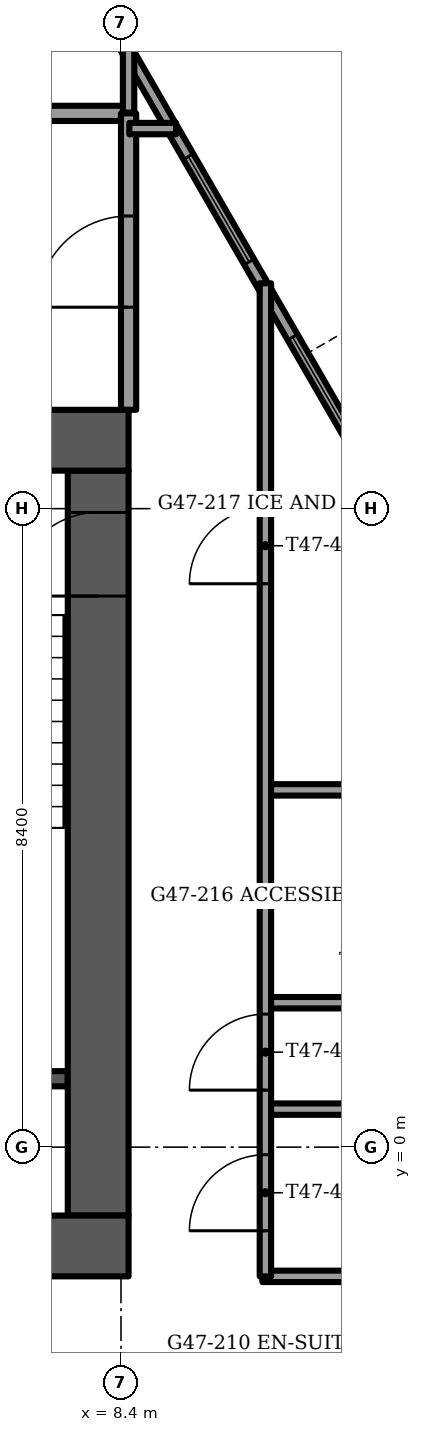
"""IFC4 building model, lengths in metres.
Left out: names, types, materials, properties, quantities, classifications, styles, units other than length and angle.
Written with IfcOpenShell. Run it as: python <this file> out.ifc"""

import sys

from ifc_helpers import new_model, si_unit, direction, frame, frame_2d, origin, place, context, subcontext, project, spatial, rectangle, extrude, element, fill, save


model = new_model("IFC4")
c1 = context("Model", 3, precision=1e-05, world=origin(), true_north=direction((0.0, 1.0)))
c2 = subcontext(c1, "Body", "Model", "MODEL_VIEW")
j1 = project(units=[si_unit("LENGTHUNIT", "METRE"), si_unit("PLANEANGLEUNIT", "RADIAN")], contexts=[c1])
p1 = place(None, origin())
s1 = spatial("IfcSite", under=j1, at=p1, CompositionType="ELEMENT")
p2 = place(p1, origin())
s2 = spatial("IfcBuilding", under=s1, at=p2, CompositionType="ELEMENT")
p3 = place(p2, frame((0.0, 0.0, 190.75)))
s3 = spatial("IfcBuildingStorey", under=s2, at=p3, CompositionType="ELEMENT", Elevation=190.75)
p4 = place(p3, frame((-8.5, -1.3, -0.3), z_axis=(0.0, 0.0, 1.0), x_axis=(1.0, 0.0, 0.0)))
e1 = element("IfcWall", 1, at=p4, inside=s3, PredefinedType="SHEAR", context=c2, shape_type="SweptSolid", body=[
    extrude(rectangle(XDim=17.0, YDim=0.8, at=frame_2d((8.5, 0.0))), origin(), (0.0, 0.0, 1.0), 3.75),
])
p5 = place(p4, frame((7.7, 0.0, 0.0)))
e2 = element("IfcOpeningElement", 2, at=p5, cuts=e1, PredefinedType="OPENING", context=c2, shape_type="SweptSolid", body=[
    extrude(rectangle(XDim=1.6, YDim=2.1, at=frame_2d((0.8, 1.05))), frame((0.0, 0.4, 0.0), z_axis=(0.0, -1.0, 0.0), x_axis=(1.0, 0.0, 0.0)), (0.0, 0.0, 1.0), 0.8),
])
p6 = place(p3, frame((-8.5, 9.3, -0.3), z_axis=(0.0, 0.0, 1.0), x_axis=(1.0, 0.0, 0.0)))
e3 = element("IfcWall", 3, at=p6, inside=s3, PredefinedType="SHEAR", context=c2, shape_type="SweptSolid", body=[
    extrude(rectangle(XDim=17.0, YDim=0.8, at=frame_2d((8.5, 0.0))), origin(), (0.0, 0.0, 1.0), 3.75),
])
p7 = place(p6, frame((7.7, 0.0, 0.0)))
e4 = element("IfcOpeningElement", 4, at=p7, cuts=e3, PredefinedType="OPENING", context=c2, shape_type="SweptSolid", body=[
    extrude(rectangle(XDim=1.6, YDim=2.1, at=frame_2d((0.8, 1.05))), frame((0.0, 0.4, 0.0), z_axis=(0.0, -1.0, 0.0), x_axis=(1.0, 0.0, 0.0)), (0.0, 0.0, 1.0), 0.8),
])
p8 = place(p6, frame((1.75, 0.0, 0.0)))
e5 = element("IfcOpeningElement", 5, at=p8, cuts=e3, PredefinedType="OPENING", context=c2, shape_type="SweptSolid", body=[
    extrude(rectangle(XDim=1.1, YDim=2.1, at=frame_2d((0.55, 1.05))), frame((0.0, 0.4, 0.0), z_axis=(0.0, -1.0, 0.0), x_axis=(1.0, 0.0, 0.0)), (0.0, 0.0, 1.0), 0.8),
])
p9 = place(p6, frame((14.15, 0.0, 0.0)))
e6 = element("IfcOpeningElement", 6, at=p9, cuts=e3, PredefinedType="OPENING", context=c2, shape_type="SweptSolid", body=[
    extrude(rectangle(XDim=1.1, YDim=2.1, at=frame_2d((0.55, 1.05))), frame((0.0, 0.4, 0.0), z_axis=(0.0, -1.0, 0.0), x_axis=(1.0, 0.0, 0.0)), (0.0, 0.0, 1.0), 0.8),
])
p10 = place(p3, frame((8.1, -0.9, -0.3), z_axis=(0.0, 0.0, 1.0), x_axis=(0.0, 1.0, 0.0)))
e7 = element("IfcWall", 7, at=p10, inside=s3, PredefinedType="SHEAR", context=c2, shape_type="SweptSolid", body=[
    extrude(rectangle(XDim=9.8, YDim=0.8, at=frame_2d((4.9, 0.0))), origin(), (0.0, 0.0, 1.0), 3.75),
])
p11 = place(p10, frame((8.15, 0.0, 0.0)))
e8 = element("IfcOpeningElement", 8, at=p11, cuts=e7, PredefinedType="OPENING", context=c2, shape_type="SweptSolid", body=[
    extrude(rectangle(XDim=1.1, YDim=2.1, at=frame_2d((0.55, 1.05))), frame((0.0, 0.4, 0.0), z_axis=(0.0, -1.0, 0.0), x_axis=(1.0, 0.0, 0.0)), (0.0, 0.0, 1.0), 0.8),
])
p12 = place(p3, frame((13.096, 12.282, 0.0), z_axis=(0.0, 0.0, 1.0), x_axis=(-0.500005767435, 0.866022073929, 0.0)))
e9 = element("IfcWall", 9, at=p12, inside=s3, PredefinedType="PARAPET", context=c2, shape_type="SweptSolid", body=[
    extrude(rectangle(XDim=6.465, YDim=0.9, at=frame_2d((3.232, 0.0))), origin(), (0.0, 0.0, 1.0), 1.1),
])
p13 = place(p3, frame((9.714, -14.025, 0.0), z_axis=(0.0, 0.0, 1.0), x_axis=(0.500006098247, 0.866021882931, 0.0)))
e10 = element("IfcWall", 10, at=p13, inside=s3, PredefinedType="SOLIDWALL", context=c2, shape_type="SweptSolid", body=[
    extrude(rectangle(XDim=14.578, YDim=0.15, at=frame_2d((7.289, 0.0))), origin(), (0.0, 0.0, 1.0), 3.45),
])
p14 = place(p13, frame((1.289, 0.0, 0.15)))
e11 = element("IfcOpeningElement", 11, at=p14, cuts=e10, PredefinedType="OPENING", context=c2, shape_type="SweptSolid", body=[
    extrude(rectangle(XDim=1.6, YDim=2.85, at=frame_2d((0.8, 1.425))), frame((0.0, 0.075, 0.0), z_axis=(0.0, -1.0, 0.0), x_axis=(1.0, 0.0, 0.0)), (0.0, 0.0, 1.0), 0.15),
])
p15 = place(p13, frame((3.489, 0.0, 0.0)))
e12 = element("IfcOpeningElement", 12, at=p15, cuts=e10, PredefinedType="OPENING", context=c2, shape_type="SweptSolid", body=[
    extrude(rectangle(XDim=1.4, YDim=2.4, at=frame_2d((0.7, 1.2))), frame((0.0, 0.075, 0.0), z_axis=(0.0, -1.0, 0.0), x_axis=(1.0, 0.0, 0.0)), (0.0, 0.0, 1.0), 0.15),
])
p16 = place(p13, frame((5.489, 0.0, 0.15)))
e13 = element("IfcOpeningElement", 13, at=p16, cuts=e10, PredefinedType="OPENING", context=c2, shape_type="SweptSolid", body=[
    extrude(rectangle(XDim=0.9, YDim=2.85, at=frame_2d((0.45, 1.425))), frame((0.0, 0.075, 0.0), z_axis=(0.0, -1.0, 0.0), x_axis=(1.0, 0.0, 0.0)), (0.0, 0.0, 1.0), 0.15),
])
p17 = place(p13, frame((6.646, 0.0, 0.0)))
e14 = element("IfcOpeningElement", 14, at=p17, cuts=e10, PredefinedType="OPENING", context=c2, shape_type="SweptSolid", body=[
    extrude(rectangle(XDim=1.4, YDim=2.4, at=frame_2d((0.7, 1.2))), frame((0.0, 0.075, 0.0), z_axis=(0.0, -1.0, 0.0), x_axis=(1.0, 0.0, 0.0)), (0.0, 0.0, 1.0), 0.15),
])
p18 = place(p13, frame((12.298, 0.0, 0.15)))
e15 = element("IfcOpeningElement", 15, at=p18, cuts=e10, PredefinedType="OPENING", context=c2, shape_type="SweptSolid", body=[
    extrude(rectangle(XDim=0.9, YDim=2.85, at=frame_2d((0.45, 1.425))), frame((0.0, 0.075, 0.0), z_axis=(0.0, -1.0, 0.0), x_axis=(1.0, 0.0, 0.0)), (0.0, 0.0, 1.0), 0.15),
])
p19 = place(p13, frame((10.198, 0.0, 0.15)))
e16 = element("IfcOpeningElement", 16, at=p19, cuts=e10, PredefinedType="OPENING", context=c2, shape_type="SweptSolid", body=[
    extrude(rectangle(XDim=1.4, YDim=2.85, at=frame_2d((0.7, 1.425))), frame((0.0, 0.075, 0.0), z_axis=(0.0, -1.0, 0.0), x_axis=(1.0, 0.0, 0.0)), (0.0, 0.0, 1.0), 0.15),
])
p20 = place(p3, frame((17.003, -0.335, 0.0), z_axis=(0.0, 0.0, 1.0), x_axis=(-0.50000659594, 0.866021595583, 0.0)))
e17 = element("IfcWall", 17, at=p20, inside=s3, PredefinedType="SOLIDWALL", context=c2, shape_type="SweptSolid", body=[
    extrude(rectangle(XDim=20.354, YDim=0.15, at=frame_2d((10.177, 0.0))), origin(), (0.0, 0.0, 1.0), 3.45),
])
p21 = place(p20, frame((1.288, 0.0, 0.15)))
e18 = element("IfcOpeningElement", 18, at=p21, cuts=e17, PredefinedType="OPENING", context=c2, shape_type="SweptSolid", body=[
    extrude(rectangle(XDim=0.9, YDim=2.85, at=frame_2d((0.45, 1.425))), frame((0.0, 0.075, 0.0), z_axis=(0.0, -1.0, 0.0), x_axis=(1.0, 0.0, 0.0)), (0.0, 0.0, 1.0), 0.15),
])
p22 = place(p20, frame((2.892, 0.0, 0.0)))
e19 = element("IfcOpeningElement", 19, at=p22, cuts=e17, PredefinedType="OPENING", context=c2, shape_type="SweptSolid", body=[
    extrude(rectangle(XDim=1.4, YDim=2.4, at=frame_2d((0.7, 1.2))), frame((0.0, 0.075, 0.0), z_axis=(0.0, -1.0, 0.0), x_axis=(1.0, 0.0, 0.0)), (0.0, 0.0, 1.0), 0.15),
])
p23 = place(p20, frame((6.138, 0.0, 0.15)))
e20 = element("IfcOpeningElement", 20, at=p23, cuts=e17, PredefinedType="OPENING", context=c2, shape_type="SweptSolid", body=[
    extrude(rectangle(XDim=0.9, YDim=2.85, at=frame_2d((0.45, 1.425))), frame((0.0, 0.075, 0.0), z_axis=(0.0, -1.0, 0.0), x_axis=(1.0, 0.0, 0.0)), (0.0, 0.0, 1.0), 0.15),
])
p24 = place(p20, frame((7.092, 0.0, 0.15)))
e21 = element("IfcOpeningElement", 21, at=p24, cuts=e17, PredefinedType="OPENING", context=c2, shape_type="SweptSolid", body=[
    extrude(rectangle(XDim=1.4, YDim=2.85, at=frame_2d((0.7, 1.425))), frame((0.0, 0.075, 0.0), z_axis=(0.0, -1.0, 0.0), x_axis=(1.0, 0.0, 0.0)), (0.0, 0.0, 1.0), 0.15),
])
p25 = place(p20, frame((9.092, 0.0, 0.15)))
e22 = element("IfcOpeningElement", 22, at=p25, cuts=e17, PredefinedType="OPENING", context=c2, shape_type="SweptSolid", body=[
    extrude(rectangle(XDim=1.6, YDim=2.85, at=frame_2d((0.8, 1.425))), frame((0.0, 0.075, 0.0), z_axis=(0.0, -1.0, 0.0), x_axis=(1.0, 0.0, 0.0)), (0.0, 0.0, 1.0), 0.15),
])
p26 = place(p20, frame((11.292, 0.0, 0.15)))
e23 = element("IfcOpeningElement", 23, at=p26, cuts=e17, PredefinedType="OPENING", context=c2, shape_type="SweptSolid", body=[
    extrude(rectangle(XDim=1.4, YDim=2.85, at=frame_2d((0.7, 1.425))), frame((0.0, 0.075, 0.0), z_axis=(0.0, -1.0, 0.0), x_axis=(1.0, 0.0, 0.0)), (0.0, 0.0, 1.0), 0.15),
])
p27 = place(p20, frame((13.834, 0.0, 0.15)))
e24 = element("IfcOpeningElement", 24, at=p27, cuts=e17, PredefinedType="OPENING", context=c2, shape_type="SweptSolid", body=[
    extrude(rectangle(XDim=1.6, YDim=2.85, at=frame_2d((0.8, 1.425))), frame((0.0, 0.075, 0.0), z_axis=(0.0, -1.0, 0.0), x_axis=(1.0, 0.0, 0.0)), (0.0, 0.0, 1.0), 0.15),
])
p28 = place(p20, frame((18.023, 0.0, 0.15)))
e25 = element("IfcOpeningElement", 25, at=p28, cuts=e17, PredefinedType="OPENING", context=c2, shape_type="SweptSolid", body=[
    extrude(rectangle(XDim=1.6, YDim=2.73, at=frame_2d((0.8, 1.365))), frame((0.0, 0.075, 0.0), z_axis=(0.0, -1.0, 0.0), x_axis=(1.0, 0.0, 0.0)), (0.0, 0.0, 1.0), 0.15),
])
p29 = place(p3, frame((4.45, 0.9, -0.3), z_axis=(0.0, 0.0, 1.0), x_axis=(1.0, 0.0, 0.0)))
e26 = element("IfcWall", 26, at=p29, inside=s3, PredefinedType="SOLIDWALL", context=c2, shape_type="SweptSolid", body=[
    extrude(rectangle(XDim=3.25, YDim=0.2, at=frame_2d((1.625, 0.0))), origin(), (0.0, 0.0, 1.0), 3.75),
])
p30 = place(p3, frame((-8.5, 13.6, 0.0), z_axis=(0.0, 0.0, 1.0), x_axis=(1.0, 0.0, 0.0)))
e27 = element("IfcWall", 27, at=p30, inside=s3, PredefinedType="PARTITIONING", context=c2, shape_type="SweptSolid", body=[
    extrude(rectangle(XDim=17.0, YDim=0.2, at=frame_2d((8.5, 0.0))), origin(), (0.0, 0.0, 1.0), 3.45),
])
p31 = place(p30, frame((8.0, 0.0, 0.0)))
e28 = element("IfcOpeningElement", 28, at=p31, cuts=e27, PredefinedType="OPENING", context=c2, shape_type="SweptSolid", body=[
    extrude(rectangle(XDim=1.0, YDim=2.1, at=frame_2d((0.5, 1.05))), frame((0.0, 0.1, 0.0), z_axis=(0.0, -1.0, 0.0), x_axis=(1.0, 0.0, 0.0)), (0.0, 0.0, 1.0), 0.2),
])
p32 = place(p3, frame((8.5, 9.7, 0.0), z_axis=(0.0, 0.0, 1.0), x_axis=(0.0, 1.0, 0.0)))
e29 = element("IfcWall", 29, at=p32, inside=s3, PredefinedType="PARTITIONING", context=c2, shape_type="SweptSolid", body=[
    extrude(rectangle(XDim=3.9, YDim=0.2, at=frame_2d((1.95, 0.0))), origin(), (0.0, 0.0, 1.0), 3.45),
])
p33 = place(p32, frame((1.35, 0.0, 0.0)))
e30 = element("IfcOpeningElement", 30, at=p33, cuts=e29, PredefinedType="OPENING", context=c2, shape_type="SweptSolid", body=[
    extrude(rectangle(XDim=1.2, YDim=2.1, at=frame_2d((0.6, 1.05))), frame((0.0, 0.1, 0.0), z_axis=(0.0, -1.0, 0.0), x_axis=(1.0, 0.0, 0.0)), (0.0, 0.0, 1.0), 0.2),
])
p34 = place(p3, frame((10.26, -1.7, 0.0), z_axis=(0.0, 0.0, 1.0), x_axis=(1.0, 0.0, 0.0)))
e31 = element("IfcWall", 31, at=p34, inside=s3, PredefinedType="PARTITIONING", context=c2, shape_type="SweptSolid", body=[
    extrude(rectangle(XDim=3.54, YDim=0.15, at=frame_2d((1.77, 0.0))), origin(), (0.0, 0.0, 1.0), 3.45),
])
p35 = place(p3, frame((10.3, 0.5, 0.0), z_axis=(0.0, 0.0, 1.0), x_axis=(1.0, 0.0, 0.0)))
e32 = element("IfcWall", 32, at=p35, inside=s3, PredefinedType="PARTITIONING", context=c2, shape_type="SweptSolid", body=[
    extrude(rectangle(XDim=6.273, YDim=0.15, at=frame_2d((3.136, 0.0))), origin(), (0.0, 0.0, 1.0), 3.45),
])
p36 = place(p3, frame((10.3, 1.9, 0.0), z_axis=(0.0, 0.0, 1.0), x_axis=(1.0, 0.0, 0.0)))
e33 = element("IfcWall", 33, at=p36, inside=s3, PredefinedType="PARTITIONING", context=c2, shape_type="SweptSolid", body=[
    extrude(rectangle(XDim=3.0, YDim=0.15, at=frame_2d((1.5, 0.0))), origin(), (0.0, 0.0, 1.0), 3.45),
])
p37 = place(p36, frame((1.05, 0.0, 0.0)))
e34 = element("IfcOpeningElement", 34, at=p37, cuts=e33, PredefinedType="OPENING", context=c2, shape_type="SweptSolid", body=[
    extrude(rectangle(XDim=0.9, YDim=2.1, at=frame_2d((0.45, 1.05))), frame((0.0, 0.075, 0.0), z_axis=(0.0, -1.0, 0.0), x_axis=(1.0, 0.0, 0.0)), (0.0, 0.0, 1.0), 0.15),
])
p38 = place(p3, frame((10.3, 4.7, 0.0), z_axis=(0.0, 0.0, 1.0), x_axis=(1.0, 0.0, 0.0)))
e35 = element("IfcWall", 35, at=p38, inside=s3, PredefinedType="PARTITIONING", context=c2, shape_type="SweptSolid", body=[
    extrude(rectangle(XDim=3.848, YDim=0.15, at=frame_2d((1.924, 0.0))), origin(), (0.0, 0.0, 1.0), 3.45),
])
p39 = place(p3, frame((8.51, 13.4, 0.0), z_axis=(0.0, 0.0, 1.0), x_axis=(1.0, 0.0, 0.0)))
e36 = element("IfcWall", 36, at=p39, inside=s3, PredefinedType="PARTITIONING", context=c2, shape_type="SweptSolid", body=[
    extrude(rectangle(XDim=0.615, YDim=0.15, at=frame_2d((0.308, 0.0))), origin(), (0.0, 0.0, 1.0), 3.45),
])
p40 = place(p3, frame((10.3, -1.7, 0.0), z_axis=(0.0, 0.0, 1.0), x_axis=(0.0, 1.0, 0.0)))
e37 = element("IfcWall", 37, at=p40, inside=s3, PredefinedType="PARTITIONING", context=c2, shape_type="SweptSolid", body=[
    extrude(rectangle(XDim=13.065, YDim=0.15, at=frame_2d((6.532, 0.0))), origin(), (0.0, 0.0, 1.0), 3.45),
])
p41 = place(p40, frame((0.6, 0.0, 0.0)))
e38 = element("IfcOpeningElement", 38, at=p41, cuts=e37, PredefinedType="OPENING", context=c2, shape_type="SweptSolid", body=[
    extrude(rectangle(XDim=1.0, YDim=2.1, at=frame_2d((0.5, 1.05))), frame((0.0, 0.075, 0.0), z_axis=(0.0, -1.0, 0.0), x_axis=(1.0, 0.0, 0.0)), (0.0, 0.0, 1.0), 0.15),
])
p42 = place(p40, frame((2.45, 0.0, 0.0)))
e39 = element("IfcOpeningElement", 39, at=p42, cuts=e37, PredefinedType="OPENING", context=c2, shape_type="SweptSolid", body=[
    extrude(rectangle(XDim=1.0, YDim=2.1, at=frame_2d((0.5, 1.05))), frame((0.0, 0.075, 0.0), z_axis=(0.0, -1.0, 0.0), x_axis=(1.0, 0.0, 0.0)), (0.0, 0.0, 1.0), 0.15),
])
p43 = place(p40, frame((9.112, 0.0, 0.0)))
e40 = element("IfcOpeningElement", 40, at=p43, cuts=e37, PredefinedType="OPENING", context=c2, shape_type="SweptSolid", body=[
    extrude(rectangle(XDim=1.0, YDim=2.1, at=frame_2d((0.5, 1.05))), frame((0.0, 0.075, 0.0), z_axis=(0.0, -1.0, 0.0), x_axis=(1.0, 0.0, 0.0)), (0.0, 0.0, 1.0), 0.15),
])
p44 = place(p3, frame((8.5, 13.61, 0.0), z_axis=(0.0, 0.0, 1.0), x_axis=(0.0, 1.0, 0.0)))
e41 = element("IfcWall", 41, at=p44, inside=s3, PredefinedType="PARTITIONING", context=c2, shape_type="SweptSolid", body=[
    extrude(rectangle(XDim=0.873, YDim=0.15, at=frame_2d((0.437, 0.0))), origin(), (0.0, 0.0, 1.0), 3.45),
])
p45 = place(p26, origin())
e42 = element("IfcWindow", 42, at=p45, inside=s3, PartitioningType="SINGLE_PANEL", PredefinedType="WINDOW", context=c2, shape_type="SweptSolid", body=[
    extrude(rectangle(XDim=1.4, YDim=2.85, at=frame_2d((0.7, 1.425))), frame((0.0, 0.03, 0.0), z_axis=(0.0, -1.0, 0.0), x_axis=(1.0, 0.0, 0.0)), (0.0, 0.0, 1.0), 0.06),
])
fill(e23, e42)
p46 = place(p27, origin())
e43 = element("IfcWindow", 43, at=p46, inside=s3, PartitioningType="SINGLE_PANEL", PredefinedType="WINDOW", context=c2, shape_type="SweptSolid", body=[
    extrude(rectangle(XDim=1.6, YDim=2.85, at=frame_2d((0.8, 1.425))), frame((0.0, 0.03, 0.0), z_axis=(0.0, -1.0, 0.0), x_axis=(1.0, 0.0, 0.0)), (0.0, 0.0, 1.0), 0.06),
])
fill(e24, e43)
p47 = place(p11, origin())
e44 = element("IfcDoor", 44, at=p47, inside=s3, OperationType="SINGLE_SWING_LEFT", PredefinedType="DOOR", context=c2, shape_type="SweptSolid", body=[
    extrude(rectangle(XDim=1.1, YDim=2.1, at=frame_2d((0.55, 1.05))), frame((0.0, 0.025, 0.0), z_axis=(0.0, -1.0, 0.0), x_axis=(1.0, 0.0, 0.0)), (0.0, 0.0, 1.0), 0.05),
])
fill(e8, e44)
p48 = place(p33, origin())
e45 = element("IfcDoor", 45, at=p48, inside=s3, OperationType="SINGLE_SWING_LEFT", PredefinedType="DOOR", context=c2, shape_type="SweptSolid", body=[
    extrude(rectangle(XDim=1.2, YDim=2.1, at=frame_2d((0.6, 1.05))), frame((0.0, 0.025, 0.0), z_axis=(0.0, -1.0, 0.0), x_axis=(1.0, 0.0, 0.0)), (0.0, 0.0, 1.0), 0.05),
])
fill(e30, e45)
p49 = place(p41, origin())
e46 = element("IfcDoor", 46, at=p49, inside=s3, OperationType="SINGLE_SWING_LEFT", PredefinedType="DOOR", context=c2, shape_type="SweptSolid", body=[
    extrude(rectangle(XDim=1.0, YDim=2.1, at=frame_2d((0.5, 1.05))), frame((0.0, 0.025, 0.0), z_axis=(0.0, -1.0, 0.0), x_axis=(1.0, 0.0, 0.0)), (0.0, 0.0, 1.0), 0.05),
])
fill(e38, e46)
p50 = place(p42, origin())
e47 = element("IfcDoor", 47, at=p50, inside=s3, OperationType="SINGLE_SWING_LEFT", PredefinedType="DOOR", context=c2, shape_type="SweptSolid", body=[
    extrude(rectangle(XDim=1.0, YDim=2.1, at=frame_2d((0.5, 1.05))), frame((0.0, 0.025, 0.0), z_axis=(0.0, -1.0, 0.0), x_axis=(1.0, 0.0, 0.0)), (0.0, 0.0, 1.0), 0.05),
])
fill(e39, e47)
p51 = place(p43, origin())
e48 = element("IfcDoor", 48, at=p51, inside=s3, OperationType="SINGLE_SWING_LEFT", PredefinedType="DOOR", context=c2, shape_type="SweptSolid", body=[
    extrude(rectangle(XDim=1.0, YDim=2.1, at=frame_2d((0.5, 1.05))), frame((0.0, 0.025, 0.0), z_axis=(0.0, -1.0, 0.0), x_axis=(1.0, 0.0, 0.0)), (0.0, 0.0, 1.0), 0.05),
])
fill(e40, e48)
save(model, sys.argv[1])
